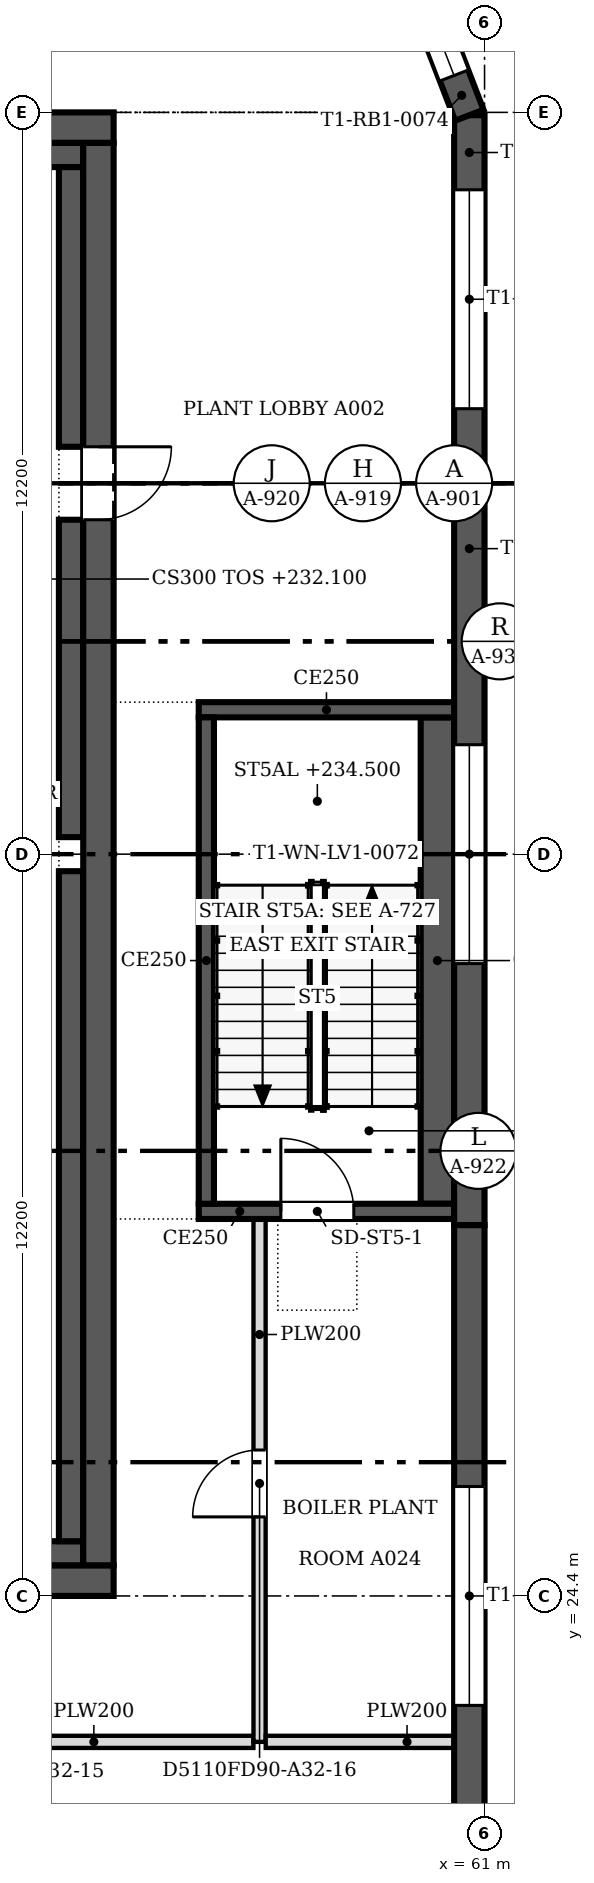
"""IFC4 building model, lengths in metres.
Left out: names, types, materials, properties, quantities, classifications, styles, units other than length and angle.
Written with IfcOpenShell. Run it as: python <this file> out.ifc"""

import sys

from ifc_helpers import new_model, si_unit, direction, frame, frame_2d, origin, place, context, subcontext, project, spatial, polyline, rectangle, outline, extrude, faceted_brep, source, transform, mapped, element, fill, save


model = new_model("IFC4")
c1 = context("Model", 3, precision=1e-05, world=origin(), true_north=direction((0.0, 1.0)))
c2 = subcontext(c1, "Body", "Model", "MODEL_VIEW")
j1 = project(units=[si_unit("LENGTHUNIT", "METRE"), si_unit("PLANEANGLEUNIT", "RADIAN")], contexts=[c1])
p1 = place(None, origin())
s1 = spatial("IfcSite", under=j1, at=p1, CompositionType="ELEMENT")
p2 = place(p1, origin())
s2 = spatial("IfcBuilding", under=s1, at=p2, CompositionType="ELEMENT")
p3 = place(p2, frame((0.0, 0.0, 232.1)))
s3 = spatial("IfcBuildingStorey", under=s2, at=p3, CompositionType="ELEMENT", Elevation=232.1)
m1 = source(origin(), c2, "Body", "SweptSolid", [
    extrude(outline(polyline([(0.0, 0.0), (12.2, 0.0), (12.2, 4.8), (0.0, 4.8), (0.0, 0.0)])), frame((0.0, 0.25, 0.0), z_axis=(0.0, -1.0, 0.0), x_axis=(1.0, 0.0, 0.0)), (0.0, 0.0, 1.0), 0.5),
])
p4 = place(p3, frame((60.75, 18.3, 0.0), z_axis=(0.0, 0.0, 1.0), x_axis=(0.0, 1.0, 0.0)))
e1 = element("IfcWall", 1, at=p4, inside=s3, PredefinedType="SOLIDWALL", context=c2, shape_type="MappedRepresentation", body=[
    mapped(m1, transform((0.0, 0.0, 0.0), scale=1.0)),
])
m2 = source(origin(), c2, "Body", "SweptSolid", [
    extrude(outline(polyline([(4.3, 0.8), (7.9, 0.8), (7.9, 4.0), (4.3, 4.0), (4.3, 0.8)])), frame((0.0, 0.26, 0.0), z_axis=(0.0, -1.0, 0.0), x_axis=(1.0, 0.0, 0.0)), (0.0, 0.0, 1.0), 0.52),
])
p5 = place(p4, origin())
e2 = element("IfcOpeningElement", 2, at=p5, cuts=e1, PredefinedType="OPENING", context=c2, shape_type="MappedRepresentation", body=[
    mapped(m2, transform((0.0, 0.0, 0.0), scale=1.0)),
])
p6 = place(p3, frame((60.75, 30.5, 0.0), z_axis=(0.0, 0.0, 1.0), x_axis=(0.0, 1.0, 0.0)))
e3 = element("IfcWall", 3, at=p6, inside=s3, PredefinedType="SOLIDWALL", context=c2, shape_type="MappedRepresentation", body=[
    mapped(m1, transform((0.0, 0.0, 0.0), scale=1.0)),
])
p7 = place(p6, origin())
e4 = element("IfcOpeningElement", 4, at=p7, cuts=e3, PredefinedType="OPENING", context=c2, shape_type="MappedRepresentation", body=[
    mapped(m2, transform((0.0, 0.0, 0.0), scale=1.0)),
])
m3 = source(origin(), c2, "Body", "Brep", [
    faceted_brep([(0.0, -0.25, 0.0), (6.053, -0.25, 0.0), (6.053, -0.25, 4.8), (0.0, -0.25, 4.8), (0.0, 0.25, 4.8), (6.007, 0.25, 4.8), (6.007, 0.25, 0.0), (0.0, 0.25, 0.0), (6.053, 0.0, 0.0), (6.053, 0.0, 4.8)], [[[0, 1, 2, 3]], [[4, 5, 6, 7]], [[7, 6, 8, 1, 0]], [[9, 2, 1, 8]], [[5, 4, 3, 2, 9]], [[4, 7, 0, 3]], [[8, 6, 5, 9]]]),
])
p8 = place(p3, frame((60.75, 42.7, 0.0), z_axis=(0.0, 0.0, 1.0), x_axis=(0.0, 1.0, 0.0)))
e5 = element("IfcWall", 5, at=p8, inside=s3, PredefinedType="SOLIDWALL", context=c2, shape_type="MappedRepresentation", body=[
    mapped(m3, transform((0.0, 0.0, 0.0), scale=1.0)),
])
m4 = source(origin(), c2, "Body", "SweptSolid", [
    extrude(outline(polyline([(1.227, 0.8), (4.827, 0.8), (4.827, 4.0), (1.227, 4.0), (1.227, 0.8)])), frame((0.0, 0.26, 0.0), z_axis=(0.0, -1.0, 0.0), x_axis=(1.0, 0.0, 0.0)), (0.0, 0.0, 1.0), 0.52),
])
p9 = place(p8, origin())
e6 = element("IfcOpeningElement", 6, at=p9, cuts=e5, PredefinedType="OPENING", context=c2, shape_type="MappedRepresentation", body=[
    mapped(m4, transform((0.0, 0.0, 0.0), scale=1.0)),
])
m5 = source(origin(), c2, "Body", "Brep", [
    faceted_brep([(0.0, -0.25, 0.0), (2.95, -0.25, 0.0), (2.95, -0.25, 4.8), (0.0, -0.25, 4.8), (0.047, 0.25, 4.8), (2.898, 0.25, 4.8), (2.898, 0.25, 0.0), (0.047, 0.25, 0.0), (2.95, 0.0, 0.0), (0.0, 0.0, 0.0), (2.95, 0.0, 4.8), (0.0, 0.0, 4.8)], [[[0, 1, 2, 3]], [[4, 5, 6, 7]], [[7, 6, 8, 1, 0, 9]], [[10, 2, 1, 8]], [[5, 4, 11, 3, 2, 10]], [[9, 0, 3, 11]], [[7, 9, 11, 4]], [[8, 6, 5, 10]]]),
])
p10 = place(p3, frame((60.75, 48.753, 0.0), z_axis=(0.0, 0.0, 1.0), x_axis=(-0.359877213415, 0.932999673775, 0.0)))
e7 = element("IfcWall", 7, at=p10, inside=s3, PredefinedType="SOLIDWALL", context=c2, shape_type="MappedRepresentation", body=[
    mapped(m5, transform((0.0, 0.0, 0.0), scale=1.0)),
])
m6 = source(origin(), c2, "Body", "SweptSolid", [
    extrude(outline(polyline([(0.7, 0.8), (2.25, 0.8), (2.25, 4.0), (0.7, 4.0), (0.7, 0.8)])), frame((0.0, 0.26, 0.0), z_axis=(0.0, -1.0, 0.0), x_axis=(1.0, 0.0, 0.0)), (0.0, 0.0, 1.0), 0.52),
])
p11 = place(p10, origin())
e8 = element("IfcOpeningElement", 8, at=p11, cuts=e7, PredefinedType="OPENING", context=c2, shape_type="MappedRepresentation", body=[
    mapped(m6, transform((0.0, 0.0, 0.0), scale=1.0)),
])
p12 = place(p3, frame((54.9, 24.65, 0.0), z_axis=(0.0, 0.0, 1.0), x_axis=(-1.0, 0.0, 0.0)))
e9 = element("IfcWall", 9, at=p12, inside=s3, PredefinedType="SHEAR", context=c2, shape_type="SweptSolid", body=[
    extrude(rectangle(XDim=24.4, YDim=0.5, at=frame_2d((12.2, 0.0))), origin(), (0.0, 0.0, 1.0), 4.8),
])
m7 = source(origin(), c2, "Body", "SweptSolid", [
    extrude(rectangle(XDim=1.2, YDim=2.1, at=frame_2d((0.6, 1.05))), frame((0.0, 0.26, 0.0), z_axis=(0.0, -1.0, 0.0), x_axis=(1.0, 0.0, 0.0)), (0.0, 0.0, 1.0), 0.52),
])
p13 = place(p12, frame((1.5, 0.0, 0.0)))
e10 = element("IfcOpeningElement", 10, at=p13, cuts=e9, PredefinedType="OPENING", context=c2, shape_type="MappedRepresentation", body=[
    mapped(m7, transform((0.0, 0.0, 0.0), scale=1.0)),
])
p14 = place(p3, frame((30.5, 48.55, 0.0), z_axis=(0.0, 0.0, 1.0), x_axis=(1.0, 0.0, 0.0)))
e11 = element("IfcWall", 11, at=p14, inside=s3, PredefinedType="SHEAR", context=c2, shape_type="SweptSolid", body=[
    extrude(rectangle(XDim=24.4, YDim=0.5, at=frame_2d((12.2, 0.0))), origin(), (0.0, 0.0, 1.0), 4.8),
])
p15 = place(p3, frame((54.65, 48.3, 0.0), z_axis=(0.0, 0.0, 1.0), x_axis=(0.0, -1.0, 0.0)))
e12 = element("IfcWall", 12, at=p15, inside=s3, PredefinedType="SHEAR", context=c2, shape_type="SweptSolid", body=[
    extrude(rectangle(XDim=23.4, YDim=0.5, at=frame_2d((11.7, 0.0))), origin(), (0.0, 0.0, 1.0), 4.8),
])
p16 = place(p15, frame((5.0, 0.0, 0.0)))
e13 = element("IfcOpeningElement", 13, at=p16, cuts=e12, PredefinedType="OPENING", context=c2, shape_type="MappedRepresentation", body=[
    mapped(m7, transform((0.0, 0.0, 0.0), scale=1.0)),
])
p17 = place(p3, frame((53.4, 25.1, 0.0), z_axis=(0.0, 0.0, 1.0), x_axis=(1.0, 0.0, 0.0)))
e14 = element("IfcWall", 14, at=p17, inside=s3, PredefinedType="SOLIDWALL", context=c2, shape_type="SweptSolid", body=[
    extrude(rectangle(XDim=1.0, YDim=0.4, at=frame_2d((0.5, 0.0))), origin(), (0.0, 0.0, 1.0), 4.8),
])
p18 = place(p3, frame((31.0, 48.1, 0.0), z_axis=(0.0, 0.0, 1.0), x_axis=(1.0, 0.0, 0.0)))
e15 = element("IfcWall", 15, at=p18, inside=s3, PredefinedType="SOLIDWALL", context=c2, shape_type="SweptSolid", body=[
    extrude(rectangle(XDim=23.4, YDim=0.4, at=frame_2d((11.7, 0.0))), origin(), (0.0, 0.0, 1.0), 4.8),
])
p19 = place(p3, frame((54.2, 25.3, 0.0), z_axis=(0.0, 0.0, 1.0), x_axis=(0.0, 1.0, 0.0)))
e16 = element("IfcWall", 16, at=p19, inside=s3, PredefinedType="SOLIDWALL", context=c2, shape_type="SweptSolid", body=[
    extrude(rectangle(XDim=11.02, YDim=0.4, at=frame_2d((5.51, 0.0))), origin(), (0.0, 0.0, 1.0), 4.8),
])
p20 = place(p3, frame((54.2, 36.88, 0.0), z_axis=(0.0, 0.0, 1.0), x_axis=(0.0, 1.0, 0.0)))
e17 = element("IfcWall", 17, at=p20, inside=s3, PredefinedType="SOLIDWALL", context=c2, shape_type="SweptSolid", body=[
    extrude(rectangle(XDim=5.22, YDim=0.4, at=frame_2d((2.61, 0.0))), origin(), (0.0, 0.0, 1.0), 4.8),
])
p21 = place(p3, frame((54.2, 43.3, 0.0), z_axis=(0.0, 0.0, 1.0), x_axis=(0.0, 1.0, 0.0)))
e18 = element("IfcWall", 18, at=p21, inside=s3, PredefinedType="SOLIDWALL", context=c2, shape_type="SweptSolid", body=[
    extrude(rectangle(XDim=4.6, YDim=0.4, at=frame_2d((2.3, 0.0))), origin(), (0.0, 0.0, 1.0), 4.8),
])
p22 = place(p3, frame((60.5, 30.725, 0.0), z_axis=(0.0, 0.0, 1.0), x_axis=(-1.0, 0.0, 0.0)))
e19 = element("IfcWall", 19, at=p22, inside=s3, PredefinedType="SOLIDWALL", context=c2, shape_type="SweptSolid", body=[
    extrude(rectangle(XDim=4.2, YDim=0.25, at=frame_2d((2.1, 0.0))), origin(), (0.0, 0.0, 1.0), 4.8),
])
m8 = source(origin(), c2, "Body", "SweptSolid", [
    extrude(rectangle(XDim=1.2, YDim=2.1, at=frame_2d((0.6, 1.05))), frame((0.0, 0.135, 0.0), z_axis=(0.0, -1.0, 0.0), x_axis=(1.0, 0.0, 0.0)), (0.0, 0.0, 1.0), 0.27),
])
p23 = place(p22, frame((1.65, 0.0, 0.0)))
e20 = element("IfcOpeningElement", 20, at=p23, cuts=e19, PredefinedType="OPENING", context=c2, shape_type="MappedRepresentation", body=[
    mapped(m8, transform((0.0, 0.0, 0.0), scale=1.0)),
])
p24 = place(p3, frame((56.425, 30.85, 0.0), z_axis=(0.0, 0.0, 1.0), x_axis=(0.0, 1.0, 0.0)))
e21 = element("IfcWall", 21, at=p24, inside=s3, PredefinedType="SOLIDWALL", context=c2, shape_type="SweptSolid", body=[
    extrude(rectangle(XDim=8.0, YDim=0.25, at=frame_2d((4.0, 0.0))), origin(), (0.0, 0.0, 1.0), 4.8),
])
p25 = place(p3, frame((56.3, 38.975, 0.0), z_axis=(0.0, 0.0, 1.0), x_axis=(1.0, 0.0, 0.0)))
e22 = element("IfcWall", 22, at=p25, inside=s3, PredefinedType="SOLIDWALL", context=c2, shape_type="SweptSolid", body=[
    extrude(rectangle(XDim=4.2, YDim=0.25, at=frame_2d((2.1, 0.0))), origin(), (0.0, 0.0, 1.0), 4.8),
])
p26 = place(p3, frame((60.225, 38.85, 0.0), z_axis=(0.0, 0.0, 1.0), x_axis=(0.0, -1.0, 0.0)))
e23 = element("IfcWall", 23, at=p26, inside=s3, PredefinedType="SOLIDWALL", context=c2, shape_type="SweptSolid", body=[
    extrude(rectangle(XDim=8.0, YDim=0.55, at=frame_2d((4.0, 0.0))), origin(), (0.0, 0.0, 1.0), 4.8),
])
p27 = place(p3, frame((57.199, 22.0, 0.0), z_axis=(0.0, 0.0, 1.0), x_axis=(-1.0, 0.0, 0.0)))
e24 = element("IfcWall", 24, at=p27, inside=s3, PredefinedType="PARTITIONING", context=c2, shape_type="SweptSolid", body=[
    extrude(rectangle(XDim=7.999, YDim=0.2, at=frame_2d((4.0, 0.0))), origin(), (0.0, 0.0, 1.0), 3.817),
])
m9 = source(origin(), c2, "Body", "SweptSolid", [
    extrude(rectangle(XDim=1.1, YDim=2.1, at=frame_2d((0.55, 1.05))), frame((0.0, 0.11, 0.0), z_axis=(0.0, -1.0, 0.0), x_axis=(1.0, 0.0, 0.0)), (0.0, 0.0, 1.0), 0.22),
])
p28 = place(p27, frame((3.499, 0.0, 0.0)))
e25 = element("IfcOpeningElement", 25, at=p28, cuts=e24, PredefinedType="OPENING", context=c2, shape_type="MappedRepresentation", body=[
    mapped(m9, transform((0.0, 0.0, 0.0), scale=1.0)),
])
p29 = place(p3, frame((57.3, 30.6, 0.0), z_axis=(0.0, 0.0, 1.0), x_axis=(0.0, -1.0, 0.0)))
e26 = element("IfcWall", 26, at=p29, inside=s3, PredefinedType="PARTITIONING", context=c2, shape_type="SweptSolid", body=[
    extrude(rectangle(XDim=8.6, YDim=0.2, at=frame_2d((4.3, 0.0))), origin(), (0.0, 0.0, 1.0), 3.817),
])
p30 = place(p29, frame((3.8, 0.0, 0.0)))
e27 = element("IfcOpeningElement", 27, at=p30, cuts=e26, PredefinedType="OPENING", context=c2, shape_type="MappedRepresentation", body=[
    mapped(m9, transform((0.0, 0.0, 0.0), scale=1.0)),
])
p31 = place(p3, frame((57.401, 22.0, 0.0), z_axis=(0.0, 0.0, 1.0), x_axis=(1.0, 0.0, 0.0)))
e28 = element("IfcWall", 28, at=p31, inside=s3, PredefinedType="PARTITIONING", context=c2, shape_type="SweptSolid", body=[
    extrude(rectangle(XDim=3.099, YDim=0.2, at=frame_2d((1.55, 0.0))), origin(), (0.0, 0.0, 1.0), 3.817),
])
m10 = source(origin(), c2, "Body", "SweptSolid", [
    extrude(outline(polyline([(4.3, 0.8), (7.9, 0.8), (7.9, 4.0), (4.3, 4.0), (4.3, 0.8)])), frame((0.0, 0.03, 0.0), z_axis=(0.0, -1.0, 0.0), x_axis=(1.0, 0.0, 0.0)), (0.0, 0.0, 1.0), 0.06),
])
p32 = place(p5, origin())
e29 = element("IfcWindow", 29, at=p32, inside=s3, PartitioningType="USERDEFINED", PredefinedType="WINDOW", context=c2, shape_type="MappedRepresentation", body=[
    mapped(m10, transform((0.0, 0.0, 0.0), scale=1.0)),
])
fill(e2, e29)
p33 = place(p7, origin())
e30 = element("IfcWindow", 30, at=p33, inside=s3, PartitioningType="USERDEFINED", PredefinedType="WINDOW", context=c2, shape_type="MappedRepresentation", body=[
    mapped(m10, transform((0.0, 0.0, 0.0), scale=1.0)),
])
fill(e4, e30)
m11 = source(origin(), c2, "Body", "SweptSolid", [
    extrude(outline(polyline([(1.227, 0.8), (4.827, 0.8), (4.827, 4.0), (1.227, 4.0), (1.227, 0.8)])), frame((0.0, 0.03, 0.0), z_axis=(0.0, -1.0, 0.0), x_axis=(1.0, 0.0, 0.0)), (0.0, 0.0, 1.0), 0.06),
])
p34 = place(p9, origin())
e31 = element("IfcWindow", 31, at=p34, inside=s3, PartitioningType="USERDEFINED", PredefinedType="WINDOW", context=c2, shape_type="MappedRepresentation", body=[
    mapped(m11, transform((0.0, 0.0, 0.0), scale=1.0)),
])
fill(e6, e31)
m12 = source(origin(), c2, "Body", "SweptSolid", [
    extrude(outline(polyline([(0.7, 0.8), (2.25, 0.8), (2.25, 4.0), (0.7, 4.0), (0.7, 0.8)])), frame((0.0, 0.03, 0.0), z_axis=(0.0, -1.0, 0.0), x_axis=(1.0, 0.0, 0.0)), (0.0, 0.0, 1.0), 0.06),
])
p35 = place(p11, origin())
e32 = element("IfcWindow", 32, at=p35, inside=s3, PartitioningType="USERDEFINED", PredefinedType="WINDOW", context=c2, shape_type="MappedRepresentation", body=[
    mapped(m12, transform((0.0, 0.0, 0.0), scale=1.0)),
])
fill(e8, e32)
m13 = source(origin(), c2, "Body", "SweptSolid", [
    extrude(rectangle(XDim=1.2, YDim=2.1, at=frame_2d((0.6, 1.05))), frame((0.0, 0.025, 0.0), z_axis=(0.0, -1.0, 0.0), x_axis=(1.0, 0.0, 0.0)), (0.0, 0.0, 1.0), 0.05),
])
p36 = place(p16, origin())
e33 = element("IfcDoor", 33, at=p36, inside=s3, OperationType="SINGLE_SWING_LEFT", PredefinedType="DOOR", context=c2, shape_type="MappedRepresentation", body=[
    mapped(m13, transform((0.0, 0.0, 0.0), scale=1.0)),
])
fill(e13, e33)
p37 = place(p23, origin())
e34 = element("IfcDoor", 34, at=p37, inside=s3, OperationType="SINGLE_SWING_RIGHT", PredefinedType="DOOR", context=c2, shape_type="MappedRepresentation", body=[
    mapped(m13, transform((0.0, 0.0, 0.0), scale=1.0)),
])
fill(e20, e34)
m14 = source(origin(), c2, "Body", "SweptSolid", [
    extrude(rectangle(XDim=1.1, YDim=2.1, at=frame_2d((0.55, 1.05))), frame((0.0, 0.025, 0.0), z_axis=(0.0, -1.0, 0.0), x_axis=(1.0, 0.0, 0.0)), (0.0, 0.0, 1.0), 0.05),
])
p38 = place(p30, origin())
e35 = element("IfcDoor", 35, at=p38, inside=s3, OperationType="SINGLE_SWING_RIGHT", PredefinedType="DOOR", context=c2, shape_type="MappedRepresentation", body=[
    mapped(m14, transform((0.0, 0.0, 0.0), scale=1.0)),
])
fill(e27, e35)
save(model, sys.argv[1])
